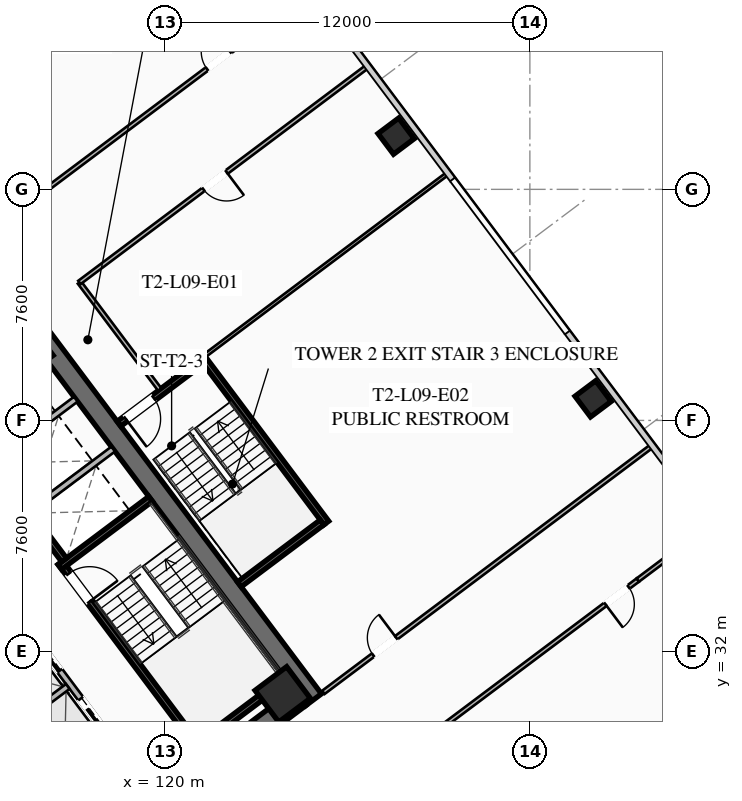
"""IFC4 building model, lengths in metres.
Left out: names, types, materials, properties, quantities, classifications, styles, units other than length and angle.
Written with IfcOpenShell. Run it as: python <this file> out.ifc"""

import sys

from ifc_helpers import new_model, si_unit, direction, frame, frame_2d, origin, origin_2d, place, context, subcontext, project, spatial, rectangle, hollow_rectangle, extrude, element, fill, save


model = new_model("IFC4")
c1 = context("Model", 3, precision=1e-05, world=origin(), true_north=direction((0.0, 1.0)))
c2 = subcontext(c1, "Body", "Model", "MODEL_VIEW")
j1 = project(units=[si_unit("LENGTHUNIT", "METRE"), si_unit("PLANEANGLEUNIT", "RADIAN")], contexts=[c1])
p1 = place(None, origin())
s1 = spatial("IfcSite", under=j1, at=p1, CompositionType="ELEMENT")
p2 = place(p1, origin())
s2 = spatial("IfcBuilding", under=s1, at=p2, CompositionType="ELEMENT")
p3 = place(p2, frame((0.0, 0.0, 38.8)))
s3 = spatial("IfcBuildingStorey", under=s2, at=p3, CompositionType="ELEMENT", Elevation=38.8)
p4 = place(p3, frame((115.524, 42.893, 0.0), z_axis=(0.0, 0.0, 1.0), x_axis=(0.600005007985, -0.799996243986, 0.0)))
e1 = element("IfcWall", 1, at=p4, inside=s3, PredefinedType="SHEAR", context=c2, shape_type="SweptSolid", body=[
    extrude(rectangle(XDim=15.6, YDim=0.65, at=frame_2d((7.8, 0.0))), origin(), (0.0, 0.0, 1.0), 3.55),
])
p5 = place(p3, frame((124.429, 30.478, 0.0), z_axis=(0.0, 0.0, 1.0), x_axis=(-0.799998028465, -0.600002628705, 0.0)))
e2 = element("IfcWall", 2, at=p5, inside=s3, PredefinedType="SHEAR", context=c2, shape_type="SweptSolid", body=[
    extrude(rectangle(XDim=14.86, YDim=0.65, at=frame_2d((7.43, 0.0))), origin(), (0.0, 0.0, 1.0), 3.55),
])
p6 = place(p5, frame((9.13, 0.0, 0.0)))
e3 = element("IfcOpeningElement", 3, at=p6, cuts=e2, PredefinedType="OPENING", context=c2, shape_type="SweptSolid", body=[
    extrude(rectangle(XDim=1.25, YDim=2.25, at=frame_2d((0.625, 1.125))), frame((0.0, 0.335, 0.0), z_axis=(0.0, -1.0, 0.0), x_axis=(1.0, 0.0, 0.0)), (0.0, 0.0, 1.0), 0.67),
])
p7 = place(p5, frame((4.08, 0.0, 0.0)))
e4 = element("IfcOpeningElement", 4, at=p7, cuts=e2, PredefinedType="OPENING", context=c2, shape_type="SweptSolid", body=[
    extrude(rectangle(XDim=1.25, YDim=2.25, at=frame_2d((0.625, 1.125))), frame((0.0, 0.335, 0.0), z_axis=(0.0, -1.0, 0.0), x_axis=(1.0, 0.0, 0.0)), (0.0, 0.0, 1.0), 0.67),
])
for number, where, z_axis, x_axis in (
    (5, (123.87, 30.59, 0.0), (0.0, 0.0, 1.0), (0.8, 0.6, 0.0)),
    (6, (115.41, 41.87, 0.0), (0.0, 0.0, 1.0), (0.8, 0.6, 0.0)),
):
    element("IfcColumn", number, at=place(p3, frame(where, z_axis=z_axis, x_axis=x_axis)), inside=s3, PredefinedType="COLUMN", context=c2, shape_type="SweptSolid", body=[
        extrude(hollow_rectangle(XDim=1.3, YDim=1.3, WallThickness=0.05, at=origin_2d()), origin(), (0.0, 0.0, 1.0), 3.35),
    ])
for number, where, z_axis, x_axis in (
    (7, (134.08, 40.31, 0.0), (0.0, 0.0, 1.0), (0.8, 0.6, 0.0)),
    (8, (127.6, 48.95, 0.0), (0.0, 0.0, 1.0), (0.8, 0.6, 0.0)),
):
    element("IfcColumn", number, at=place(p3, frame(where, z_axis=z_axis, x_axis=x_axis)), inside=s3, PredefinedType="COLUMN", context=c2, shape_type="SweptSolid", body=[
        extrude(hollow_rectangle(XDim=0.85, YDim=0.85, WallThickness=0.035, at=origin_2d()), origin(), (0.0, 0.0, 1.0), 3.35),
    ])
p8 = place(p3, frame((116.56, 34.92, 0.0), z_axis=(0.0, 0.0, 1.0), x_axis=(0.600009827119, -0.799992629566, 0.0)))
e9 = element("IfcWall", 9, at=p8, inside=s3, PredefinedType="SHEAR", context=c2, shape_type="SweptSolid", body=[
    extrude(rectangle(XDim=7.95, YDim=0.2, at=frame_2d((3.975, 0.0))), origin(), (0.0, 0.0, 1.0), 3.35),
])
p9 = place(p8, frame((0.45, 0.0, 0.0)))
e10 = element("IfcOpeningElement", 10, at=p9, cuts=e9, PredefinedType="OPENING", context=c2, shape_type="SweptSolid", body=[
    extrude(rectangle(XDim=1.15, YDim=2.2, at=frame_2d((0.575, 1.1))), frame((0.0, 0.11, 0.0), z_axis=(0.0, -1.0, 0.0), x_axis=(1.0, 0.0, 0.0)), (0.0, 0.0, 1.0), 0.22),
])
for number, where, z_axis, x_axis in (
    (11, (116.54, 34.78, 0.0), (0.0, 0.0, 1.0), (0.8, 0.6, 0.0)),
    (12, (120.98, 28.86, 0.0), (0.0, 0.0, 1.0), (0.8, 0.6, 0.0)),
):
    element("IfcWall", number, at=place(p3, frame(where, z_axis=z_axis, x_axis=x_axis)), inside=s3, PredefinedType="SHEAR", context=c2, shape_type="SweptSolid", body=[
        extrude(rectangle(XDim=3.73, YDim=0.2, at=frame_2d((1.865, 0.0))), origin(), (0.0, 0.0, 1.0), 3.35),
    ])
p10 = place(p3, frame((117.938, 26.016, 0.0), z_axis=(0.0, 0.0, 1.0), x_axis=(-0.600005463273, 0.799995902516, 0.0)))
e13 = element("IfcWall", 13, at=p10, inside=s3, PredefinedType="SHEAR", context=c2, shape_type="SweptSolid", body=[
    extrude(rectangle(XDim=14.3, YDim=0.2, at=frame_2d((7.15, 0.0))), origin(), (0.0, 0.0, 1.0), 3.35),
])
p11 = place(p3, frame((112.87, 40.09, 0.0), z_axis=(0.0, 0.0, 1.0), x_axis=(0.599975393228, -0.800018454488, 0.0)))
e14 = element("IfcWall", 14, at=p11, inside=s3, PredefinedType="SHEAR", context=c2, shape_type="SweptSolid", body=[
    extrude(rectangle(XDim=6.35, YDim=0.2, at=frame_2d((3.175, 0.0))), origin(), (0.0, 0.0, 1.0), 3.35),
])
for number, where, z_axis, x_axis in (
    (15, (115.59, 36.63, 0.0), (0.0, 0.0, 1.0), (0.8, 0.6, 0.0)),
    (16, (114.36, 38.27, 0.0), (0.0, 0.0, 1.0), (0.8, 0.6, 0.0)),
):
    element("IfcWall", number, at=place(p3, frame(where, z_axis=z_axis, x_axis=x_axis)), inside=s3, PredefinedType="SOLIDWALL", context=c2, shape_type="SweptSolid", body=[
        extrude(rectangle(XDim=3.38, YDim=0.2, at=frame_2d((1.69, 0.0))), origin(), (0.0, 0.0, 1.0), 3.35),
    ])
p12 = place(p3, frame((119.61, 27.27, 0.0), z_axis=(0.0, 0.0, 1.0), x_axis=(-0.600011488909, 0.79999138319, 0.0)))
e17 = element("IfcWall", 17, at=p12, inside=s3, PredefinedType="SOLIDWALL", context=c2, shape_type="SweptSolid", body=[
    extrude(rectangle(XDim=6.8, YDim=0.2, at=frame_2d((3.4, 0.0))), origin(), (0.0, 0.0, 1.0), 3.35),
])
p13 = place(p12, frame((0.625, 0.0, 0.0)))
e18 = element("IfcOpeningElement", 18, at=p13, cuts=e17, PredefinedType="OPENING", context=c2, shape_type="SweptSolid", body=[
    extrude(rectangle(XDim=1.1, YDim=2.2, at=frame_2d((0.55, 1.1))), frame((0.0, 0.11, 0.0), z_axis=(0.0, -1.0, 0.0), x_axis=(1.0, 0.0, 0.0)), (0.0, 0.0, 1.0), 0.22),
])
p14 = place(p12, frame((2.875, 0.0, 0.0)))
e19 = element("IfcOpeningElement", 19, at=p14, cuts=e17, PredefinedType="OPENING", context=c2, shape_type="SweptSolid", body=[
    extrude(rectangle(XDim=1.1, YDim=2.2, at=frame_2d((0.55, 1.1))), frame((0.0, 0.11, 0.0), z_axis=(0.0, -1.0, 0.0), x_axis=(1.0, 0.0, 0.0)), (0.0, 0.0, 1.0), 0.22),
])
p15 = place(p12, frame((5.125, 0.0, 0.0)))
e20 = element("IfcOpeningElement", 20, at=p15, cuts=e17, PredefinedType="OPENING", context=c2, shape_type="SweptSolid", body=[
    extrude(rectangle(XDim=1.1, YDim=2.2, at=frame_2d((0.55, 1.1))), frame((0.0, 0.11, 0.0), z_axis=(0.0, -1.0, 0.0), x_axis=(1.0, 0.0, 0.0)), (0.0, 0.0, 1.0), 0.22),
])
p16 = place(p3, frame((115.296, 29.722, 0.0), z_axis=(0.0, 0.0, 1.0), x_axis=(0.799984418148, 0.600020775241, 0.0)))
e21 = element("IfcWall", 21, at=p16, inside=s3, PredefinedType="SOLIDWALL", context=c2, shape_type="SweptSolid", body=[
    extrude(rectangle(XDim=1.88, YDim=0.2, at=frame_2d((0.94, 0.0))), origin(), (0.0, 0.0, 1.0), 3.35),
])
p17 = place(p3, frame((125.304, 36.228, 0.0), z_axis=(0.0, 0.0, 1.0), x_axis=(-0.59998851072, 0.800008616831, 0.0)))
e22 = element("IfcWall", 22, at=p17, inside=s3, PredefinedType="SHEAR", context=c2, shape_type="SweptSolid", body=[
    extrude(rectangle(XDim=6.8, YDim=0.2, at=frame_2d((3.4, 0.0))), origin(), (0.0, 0.0, 1.0), 3.35),
])
p18 = place(p3, frame((121.204, 41.528, 0.0), z_axis=(0.0, 0.0, 1.0), x_axis=(-0.800017232136, -0.599977023131, 0.0)))
e23 = element("IfcWall", 23, at=p18, inside=s3, PredefinedType="SHEAR", context=c2, shape_type="SweptSolid", body=[
    extrude(rectangle(XDim=3.4, YDim=0.2, at=frame_2d((1.7, 0.0))), origin(), (0.0, 0.0, 1.0), 3.35),
])
p19 = place(p18, frame((1.975, 0.0, 0.0)))
e24 = element("IfcOpeningElement", 24, at=p19, cuts=e23, PredefinedType="OPENING", context=c2, shape_type="SweptSolid", body=[
    extrude(rectangle(XDim=1.15, YDim=2.2, at=frame_2d((0.575, 1.1))), frame((0.0, 0.11, 0.0), z_axis=(0.0, -1.0, 0.0), x_axis=(1.0, 0.0, 0.0)), (0.0, 0.0, 1.0), 0.22),
])
p20 = place(p3, frame((122.444, 34.208, 0.0), z_axis=(0.0, 0.0, 1.0), x_axis=(0.79999138319, 0.600011488909, 0.0)))
e25 = element("IfcWall", 25, at=p20, inside=s3, PredefinedType="SHEAR", context=c2, shape_type="SweptSolid", body=[
    extrude(rectangle(XDim=3.4, YDim=0.2, at=frame_2d((1.7, 0.0))), origin(), (0.0, 0.0, 1.0), 3.35),
])
p21 = place(p3, frame((119.824, 40.618, 0.0), z_axis=(0.0, 0.0, 1.0), x_axis=(-0.599982243973, 0.800013316712, 0.0)))
e26 = element("IfcWall", 26, at=p21, inside=s3, PredefinedType="PARTITIONING", context=c2, shape_type="SweptSolid", body=[
    extrude(rectangle(XDim=4.4, YDim=0.135, at=frame_2d((2.2, 0.0))), origin(), (0.0, 0.0, 1.0), 2.703),
])
p22 = place(p3, frame((98.316, 33.862, 0.0), z_axis=(0.0, 0.0, 1.0), x_axis=(0.800001947934, 0.599997402746, 0.0)))
e27 = element("IfcWall", 27, at=p22, inside=s3, PredefinedType="PARTITIONING", context=c2, shape_type="SweptSolid", body=[
    extrude(rectangle(XDim=30.08, YDim=0.135, at=frame_2d((15.04, 0.0))), origin(), (0.0, 0.0, 1.0), 2.703),
])
p23 = place(p22, frame((0.3, 0.0, 0.0)))
e28 = element("IfcOpeningElement", 28, at=p23, cuts=e27, PredefinedType="OPENING", context=c2, shape_type="SweptSolid", body=[
    extrude(rectangle(XDim=0.95, YDim=2.05, at=frame_2d((0.475, 1.025))), frame((0.0, 0.077, 0.0), z_axis=(0.0, -1.0, 0.0), x_axis=(1.0, 0.0, 0.0)), (0.0, 0.0, 1.0), 0.155),
])
p24 = place(p22, frame((7.172, 0.0, 0.0)))
e29 = element("IfcOpeningElement", 29, at=p24, cuts=e27, PredefinedType="OPENING", context=c2, shape_type="SweptSolid", body=[
    extrude(rectangle(XDim=0.95, YDim=2.05, at=frame_2d((0.475, 1.025))), frame((0.0, 0.077, 0.0), z_axis=(0.0, -1.0, 0.0), x_axis=(1.0, 0.0, 0.0)), (0.0, 0.0, 1.0), 0.155),
])
p25 = place(p22, frame((11.218, 0.0, 0.0)))
e30 = element("IfcOpeningElement", 30, at=p25, cuts=e27, PredefinedType="OPENING", context=c2, shape_type="SweptSolid", body=[
    extrude(rectangle(XDim=0.95, YDim=2.05, at=frame_2d((0.475, 1.025))), frame((0.0, 0.077, 0.0), z_axis=(0.0, -1.0, 0.0), x_axis=(1.0, 0.0, 0.0)), (0.0, 0.0, 1.0), 0.155),
])
p26 = place(p22, frame((28.83, 0.0, 0.0)))
e31 = element("IfcOpeningElement", 31, at=p26, cuts=e27, PredefinedType="OPENING", context=c2, shape_type="SweptSolid", body=[
    extrude(rectangle(XDim=0.95, YDim=2.05, at=frame_2d((0.475, 1.025))), frame((0.0, 0.077, 0.0), z_axis=(0.0, -1.0, 0.0), x_axis=(1.0, 0.0, 0.0)), (0.0, 0.0, 1.0), 0.155),
])
p27 = place(p3, frame((135.55, 34.35, 0.0), z_axis=(0.0, 0.0, 1.0), x_axis=(-0.799998052067, -0.600002597235, 0.0)))
e32 = element("IfcWall", 32, at=p27, inside=s3, PredefinedType="PARTITIONING", context=c2, shape_type="SweptSolid", body=[
    extrude(rectangle(XDim=30.08, YDim=0.135, at=frame_2d((15.04, 0.0))), origin(), (0.0, 0.0, 1.0), 2.703),
])
p28 = place(p27, frame((28.75, 0.0, 0.0)))
e33 = element("IfcOpeningElement", 33, at=p28, cuts=e32, PredefinedType="OPENING", context=c2, shape_type="SweptSolid", body=[
    extrude(rectangle(XDim=0.95, YDim=2.05, at=frame_2d((0.475, 1.025))), frame((0.0, 0.077, 0.0), z_axis=(0.0, -1.0, 0.0), x_axis=(1.0, 0.0, 0.0)), (0.0, 0.0, 1.0), 0.155),
])
p29 = place(p27, frame((21.999, 0.0, 0.0)))
e34 = element("IfcOpeningElement", 34, at=p29, cuts=e32, PredefinedType="OPENING", context=c2, shape_type="SweptSolid", body=[
    extrude(rectangle(XDim=0.95, YDim=2.05, at=frame_2d((0.475, 1.025))), frame((0.0, 0.077, 0.0), z_axis=(0.0, -1.0, 0.0), x_axis=(1.0, 0.0, 0.0)), (0.0, 0.0, 1.0), 0.155),
])
p30 = place(p27, frame((17.939, 0.0, 0.0)))
e35 = element("IfcOpeningElement", 35, at=p30, cuts=e32, PredefinedType="OPENING", context=c2, shape_type="SweptSolid", body=[
    extrude(rectangle(XDim=0.95, YDim=2.05, at=frame_2d((0.475, 1.025))), frame((0.0, 0.077, 0.0), z_axis=(0.0, -1.0, 0.0), x_axis=(1.0, 0.0, 0.0)), (0.0, 0.0, 1.0), 0.155),
])
p31 = place(p27, frame((0.38, 0.0, 0.0)))
e36 = element("IfcOpeningElement", 36, at=p31, cuts=e32, PredefinedType="OPENING", context=c2, shape_type="SweptSolid", body=[
    extrude(rectangle(XDim=0.95, YDim=2.05, at=frame_2d((0.475, 1.025))), frame((0.0, 0.077, 0.0), z_axis=(0.0, -1.0, 0.0), x_axis=(1.0, 0.0, 0.0)), (0.0, 0.0, 1.0), 0.155),
])
p32 = place(p3, frame((135.55, 34.35, 0.0), z_axis=(0.0, 0.0, 1.0), x_axis=(0.800029006059, 0.599961323307, 0.0)))
e37 = element("IfcWall", 37, at=p32, inside=s3, PredefinedType="PARTITIONING", context=c2, shape_type="SweptSolid", body=[
    extrude(rectangle(XDim=3.03, YDim=0.135, at=frame_2d((1.515, 0.0))), origin(), (0.0, 0.0, 1.0), 2.703),
])
p33 = place(p3, frame((126.664, 51.248, 0.0), z_axis=(0.0, 0.0, 1.0), x_axis=(-0.799995055373, -0.600006592779, 0.0)))
e38 = element("IfcWall", 38, at=p33, inside=s3, PredefinedType="PARTITIONING", context=c2, shape_type="SweptSolid", body=[
    extrude(rectangle(XDim=11.85, YDim=0.135, at=frame_2d((5.925, 0.0))), origin(), (0.0, 0.0, 1.0), 2.703),
])
p34 = place(p33, frame((5.8, 0.0, 0.0)))
e39 = element("IfcOpeningElement", 39, at=p34, cuts=e38, PredefinedType="OPENING", context=c2, shape_type="SweptSolid", body=[
    extrude(rectangle(XDim=0.95, YDim=2.05, at=frame_2d((0.475, 1.025))), frame((0.0, 0.077, 0.0), z_axis=(0.0, -1.0, 0.0), x_axis=(1.0, 0.0, 0.0)), (0.0, 0.0, 1.0), 0.155),
])
p35 = place(p3, frame((125.208, 30.656, 0.0), z_axis=(0.0, 0.0, 1.0), x_axis=(0.799995666112, 0.600005778473, 0.0)))
e40 = element("IfcWall", 40, at=p35, inside=s3, PredefinedType="PARTITIONING", context=c2, shape_type="SweptSolid", body=[
    extrude(rectangle(XDim=13.52, YDim=0.135, at=frame_2d((6.76, 0.0))), origin(), (0.0, 0.0, 1.0), 2.703),
])
p36 = place(p35, frame((2.045, 0.0, 0.0)))
e41 = element("IfcOpeningElement", 41, at=p36, cuts=e40, PredefinedType="OPENING", context=c2, shape_type="SweptSolid", body=[
    extrude(rectangle(XDim=0.95, YDim=2.05, at=frame_2d((0.475, 1.025))), frame((0.0, 0.077, 0.0), z_axis=(0.0, -1.0, 0.0), x_axis=(1.0, 0.0, 0.0)), (0.0, 0.0, 1.0), 0.155),
])
p37 = place(p3, frame((129.304, 47.728, 0.0), z_axis=(0.0, 0.0, 1.0), x_axis=(-0.8, -0.6, 0.0)))
e42 = element("IfcWall", 42, at=p37, inside=s3, PredefinedType="PARTITIONING", context=c2, shape_type="SweptSolid", body=[
    extrude(rectangle(XDim=10.0, YDim=0.11, at=frame_2d((5.0, 0.0))), origin(), (0.0, 0.0, 1.0), 2.703),
])
p38 = place(p9, origin())
e43 = element("IfcDoor", 43, at=p38, inside=s3, OperationType="SINGLE_SWING_RIGHT", PredefinedType="DOOR", context=c2, shape_type="SweptSolid", body=[
    extrude(rectangle(XDim=1.15, YDim=2.2, at=frame_2d((0.575, 1.1))), frame((0.0, 0.025, 0.0), z_axis=(0.0, -1.0, 0.0), x_axis=(1.0, 0.0, 0.0)), (0.0, 0.0, 1.0), 0.05),
])
fill(e10, e43)
p39 = place(p19, origin())
e44 = element("IfcDoor", 44, at=p39, inside=s3, OperationType="SINGLE_SWING_RIGHT", PredefinedType="DOOR", context=c2, shape_type="SweptSolid", body=[
    extrude(rectangle(XDim=1.15, YDim=2.2, at=frame_2d((0.575, 1.1))), frame((0.0, 0.025, 0.0), z_axis=(0.0, -1.0, 0.0), x_axis=(1.0, 0.0, 0.0)), (0.0, 0.0, 1.0), 0.05),
])
fill(e24, e44)
p40 = place(p26, origin())
e45 = element("IfcDoor", 45, at=p40, inside=s3, OperationType="SINGLE_SWING_RIGHT", PredefinedType="DOOR", context=c2, shape_type="SweptSolid", body=[
    extrude(rectangle(XDim=0.95, YDim=2.05, at=frame_2d((0.475, 1.025))), frame((0.0, 0.025, 0.0), z_axis=(0.0, -1.0, 0.0), x_axis=(1.0, 0.0, 0.0)), (0.0, 0.0, 1.0), 0.05),
])
fill(e31, e45)
p41 = place(p31, origin())
e46 = element("IfcDoor", 46, at=p41, inside=s3, OperationType="SINGLE_SWING_RIGHT", PredefinedType="DOOR", context=c2, shape_type="SweptSolid", body=[
    extrude(rectangle(XDim=0.95, YDim=2.05, at=frame_2d((0.475, 1.025))), frame((0.0, 0.025, 0.0), z_axis=(0.0, -1.0, 0.0), x_axis=(1.0, 0.0, 0.0)), (0.0, 0.0, 1.0), 0.05),
])
fill(e36, e46)
p42 = place(p34, origin())
e47 = element("IfcDoor", 47, at=p42, inside=s3, OperationType="SINGLE_SWING_LEFT", PredefinedType="DOOR", context=c2, shape_type="SweptSolid", body=[
    extrude(rectangle(XDim=0.95, YDim=2.05, at=frame_2d((0.475, 1.025))), frame((0.0, 0.025, 0.0), z_axis=(0.0, -1.0, 0.0), x_axis=(1.0, 0.0, 0.0)), (0.0, 0.0, 1.0), 0.05),
])
fill(e39, e47)
p43 = place(p36, origin())
e48 = element("IfcDoor", 48, at=p43, inside=s3, OperationType="SINGLE_SWING_RIGHT", PredefinedType="DOOR", context=c2, shape_type="SweptSolid", body=[
    extrude(rectangle(XDim=0.95, YDim=2.05, at=frame_2d((0.475, 1.025))), frame((0.0, 0.025, 0.0), z_axis=(0.0, -1.0, 0.0), x_axis=(1.0, 0.0, 0.0)), (0.0, 0.0, 1.0), 0.05),
])
fill(e41, e48)
p44 = place(p14, origin())
e49 = element("IfcDoor", 49, at=p44, inside=s3, OperationType="SLIDING_TO_LEFT", PredefinedType="DOOR", context=c2, shape_type="SweptSolid", body=[
    extrude(rectangle(XDim=1.1, YDim=2.2, at=frame_2d((0.55, 1.1))), frame((0.0, 0.025, 0.0), z_axis=(0.0, -1.0, 0.0), x_axis=(1.0, 0.0, 0.0)), (0.0, 0.0, 1.0), 0.05),
])
fill(e19, e49)
p45 = place(p15, origin())
e50 = element("IfcDoor", 50, at=p45, inside=s3, OperationType="SLIDING_TO_LEFT", PredefinedType="DOOR", context=c2, shape_type="SweptSolid", body=[
    extrude(rectangle(XDim=1.1, YDim=2.2, at=frame_2d((0.55, 1.1))), frame((0.0, 0.025, 0.0), z_axis=(0.0, -1.0, 0.0), x_axis=(1.0, 0.0, 0.0)), (0.0, 0.0, 1.0), 0.05),
])
fill(e20, e50)
save(model, sys.argv[1])
